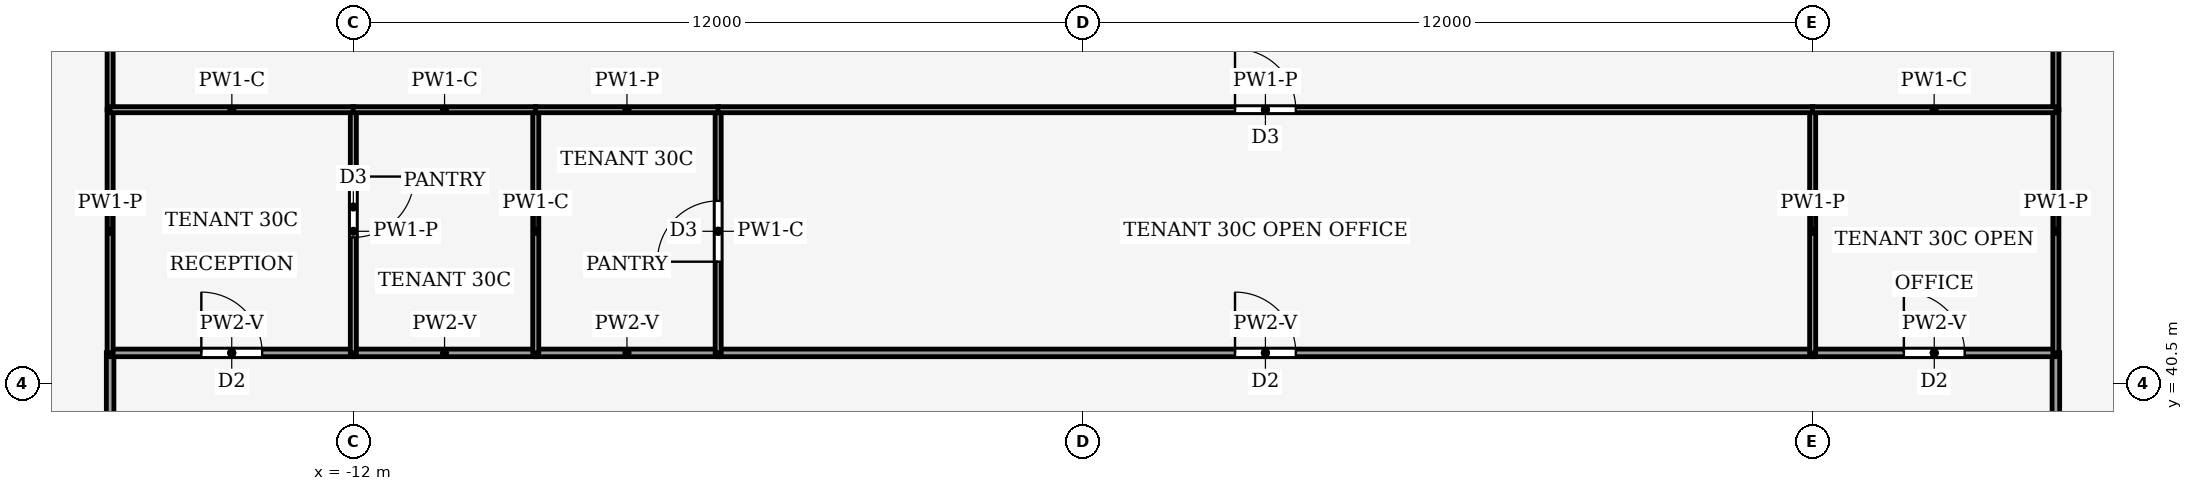
"""IFC4 building model, lengths in metres.
Left out: names, types, materials, properties, quantities, classifications, styles, units other than length and angle.
Written with IfcOpenShell. Run it as: python <this file> out.ifc"""

import sys

from ifc_helpers import new_model, si_unit, direction, frame, frame_2d, origin, place, context, subcontext, project, spatial, rectangle, extrude, element, fill, save


model = new_model("IFC4")
c1 = context("Model", 3, precision=1e-05, world=origin(), true_north=direction((0.0, 1.0)))
c2 = subcontext(c1, "Body", "Model", "MODEL_VIEW")
j1 = project(units=[si_unit("LENGTHUNIT", "METRE"), si_unit("PLANEANGLEUNIT", "RADIAN")], contexts=[c1])
p1 = place(None, origin())
s1 = spatial("IfcSite", under=j1, at=p1, CompositionType="ELEMENT")
p2 = place(p1, origin())
s2 = spatial("IfcBuilding", under=s1, at=p2, CompositionType="ELEMENT")
p3 = place(p2, frame((0.0, 0.0, 134.0)))
s3 = spatial("IfcBuildingStorey", under=s2, at=p3, CompositionType="ELEMENT", Elevation=134.0)
p4 = place(p3, frame((-16.0, 36.0, 0.0), z_axis=(0.0, 0.0, 1.0), x_axis=(0.0, 1.0, 0.0)))
e1 = element("IfcWall", 1, at=p4, inside=s3, PredefinedType="PARTITIONING", context=c2, shape_type="SweptSolid", body=[
    extrude(rectangle(XDim=5.004, YDim=0.125, at=frame_2d((2.502, 0.0))), origin(), (0.0, 0.0, 1.0), 3.14),
])
p5 = place(p4, frame((2.002, 0.0, 0.0)))
e2 = element("IfcOpeningElement", 2, at=p5, cuts=e1, PredefinedType="OPENING", context=c2, shape_type="SweptSolid", body=[
    extrude(rectangle(XDim=1.0, YDim=2.1, at=frame_2d((0.5, 1.05))), frame((0.0, 0.073, 0.0), z_axis=(0.0, -1.0, 0.0), x_axis=(1.0, 0.0, 0.0)), (0.0, 0.0, 1.0), 0.145),
])
p6 = place(p3, frame((16.0, 41.004, 0.0), z_axis=(0.0, 0.0, 1.0), x_axis=(0.0, -1.0, 0.0)))
e3 = element("IfcWall", 3, at=p6, inside=s3, PredefinedType="PARTITIONING", context=c2, shape_type="SweptSolid", body=[
    extrude(rectangle(XDim=5.004, YDim=0.125, at=frame_2d((2.502, 0.0))), origin(), (0.0, 0.0, 1.0), 3.14),
])
p7 = place(p6, frame((2.002, 0.0, 0.0)))
e4 = element("IfcOpeningElement", 4, at=p7, cuts=e3, PredefinedType="OPENING", context=c2, shape_type="SweptSolid", body=[
    extrude(rectangle(XDim=1.0, YDim=2.1, at=frame_2d((0.5, 1.05))), frame((0.0, 0.073, 0.0), z_axis=(0.0, -1.0, 0.0), x_axis=(1.0, 0.0, 0.0)), (0.0, 0.0, 1.0), 0.145),
])
p8 = place(p3, frame((-16.0, 41.0, 0.0), z_axis=(0.0, 0.0, 1.0), x_axis=(1.0, 0.0, 0.0)))
e5 = element("IfcWall", 5, at=p8, inside=s3, PredefinedType="PARTITIONING", context=c2, shape_type="SweptSolid", body=[
    extrude(rectangle(XDim=4.0, YDim=0.125, at=frame_2d((2.0, 0.0))), origin(), (0.0, 0.0, 1.0), 3.44),
])
p9 = place(p8, frame((1.5, 0.0, 0.0)))
e6 = element("IfcOpeningElement", 6, at=p9, cuts=e5, PredefinedType="OPENING", context=c2, shape_type="SweptSolid", body=[
    extrude(rectangle(XDim=1.0, YDim=2.1, at=frame_2d((0.5, 1.05))), frame((0.0, 0.073, 0.0), z_axis=(0.0, -1.0, 0.0), x_axis=(1.0, 0.0, 0.0)), (0.0, 0.0, 1.0), 0.145),
])
for number, where, z_axis, x_axis in (
    (7, (-9.0, 41.0, 0.0), (0.0, 0.0, 1.0), (-1.0, 0.0, 0.0)),
    (8, (-6.0, 41.0, 0.0), (0.0, 0.0, 1.0), (-1.0, 0.0, 0.0)),
):
    element("IfcWall", number, at=place(p3, frame(where, z_axis=z_axis, x_axis=x_axis)), inside=s3, PredefinedType="PARTITIONING", context=c2, shape_type="SweptSolid", body=[
        extrude(rectangle(XDim=3.0, YDim=0.125, at=frame_2d((1.5, 0.0))), origin(), (0.0, 0.0, 1.0), 3.44),
    ])
p10 = place(p3, frame((-6.0, 41.0, 0.0), z_axis=(0.0, 0.0, 1.0), x_axis=(1.0, 0.0, 0.0)))
e9 = element("IfcWall", 9, at=p10, inside=s3, PredefinedType="PARTITIONING", context=c2, shape_type="SweptSolid", body=[
    extrude(rectangle(XDim=18.0, YDim=0.125, at=frame_2d((9.0, 0.0))), origin(), (0.0, 0.0, 1.0), 3.44),
])
p11 = place(p10, frame((8.5, 0.0, 0.0)))
e10 = element("IfcOpeningElement", 10, at=p11, cuts=e9, PredefinedType="OPENING", context=c2, shape_type="SweptSolid", body=[
    extrude(rectangle(XDim=1.0, YDim=2.1, at=frame_2d((0.5, 1.05))), frame((0.0, 0.073, 0.0), z_axis=(0.0, -1.0, 0.0), x_axis=(1.0, 0.0, 0.0)), (0.0, 0.0, 1.0), 0.145),
])
p12 = place(p3, frame((12.0, 41.0, 0.0), z_axis=(0.0, 0.0, 1.0), x_axis=(1.0, 0.0, 0.0)))
e11 = element("IfcWall", 11, at=p12, inside=s3, PredefinedType="PARTITIONING", context=c2, shape_type="SweptSolid", body=[
    extrude(rectangle(XDim=4.0, YDim=0.125, at=frame_2d((2.0, 0.0))), origin(), (0.0, 0.0, 1.0), 3.44),
])
p13 = place(p12, frame((1.5, 0.0, 0.0)))
e12 = element("IfcOpeningElement", 12, at=p13, cuts=e11, PredefinedType="OPENING", context=c2, shape_type="SweptSolid", body=[
    extrude(rectangle(XDim=1.0, YDim=2.1, at=frame_2d((0.5, 1.05))), frame((0.0, 0.073, 0.0), z_axis=(0.0, -1.0, 0.0), x_axis=(1.0, 0.0, 0.0)), (0.0, 0.0, 1.0), 0.145),
])
p14 = place(p3, frame((-16.0, 41.0, 0.0), z_axis=(0.0, 0.0, 1.0), x_axis=(0.0, 1.0, 0.0)))
e13 = element("IfcWall", 13, at=p14, inside=s3, PredefinedType="PARTITIONING", context=c2, shape_type="SweptSolid", body=[
    extrude(rectangle(XDim=4.0, YDim=0.1, at=frame_2d((2.0, 0.0))), origin(), (0.0, 0.0, 1.0), 3.44),
])
p15 = place(p3, frame((-16.0, 45.0, 0.0), z_axis=(0.0, 0.0, 1.0), x_axis=(0.0, 1.0, 0.0)))
e14 = element("IfcWall", 14, at=p15, inside=s3, PredefinedType="PARTITIONING", context=c2, shape_type="SweptSolid", body=[
    extrude(rectangle(XDim=9.0, YDim=0.1, at=frame_2d((4.5, 0.0))), origin(), (0.0, 0.0, 1.0), 3.24),
])
p16 = place(p3, frame((16.0, 45.0, 0.0), z_axis=(0.0, 0.0, 1.0), x_axis=(0.0, -1.0, 0.0)))
e15 = element("IfcWall", 15, at=p16, inside=s3, PredefinedType="PARTITIONING", context=c2, shape_type="SweptSolid", body=[
    extrude(rectangle(XDim=4.0, YDim=0.1, at=frame_2d((2.0, 0.0))), origin(), (0.0, 0.0, 1.0), 3.44),
])
p17 = place(p3, frame((16.0, 54.0, 0.0), z_axis=(0.0, 0.0, 1.0), x_axis=(0.0, -1.0, 0.0)))
e16 = element("IfcWall", 16, at=p17, inside=s3, PredefinedType="PARTITIONING", context=c2, shape_type="SweptSolid", body=[
    extrude(rectangle(XDim=9.0, YDim=0.1, at=frame_2d((4.5, 0.0))), origin(), (0.0, 0.0, 1.0), 3.24),
])
p18 = place(p3, frame((-12.0, 45.0, 0.0), z_axis=(0.0, 0.0, 1.0), x_axis=(0.0, -1.0, 0.0)))
e17 = element("IfcWall", 17, at=p18, inside=s3, PredefinedType="PARTITIONING", context=c2, shape_type="SweptSolid", body=[
    extrude(rectangle(XDim=4.0, YDim=0.1, at=frame_2d((2.0, 0.0))), origin(), (0.0, 0.0, 1.0), 3.44),
])
p19 = place(p18, frame((1.1, 0.0, 0.0)))
e18 = element("IfcOpeningElement", 18, at=p19, cuts=e17, PredefinedType="OPENING", context=c2, shape_type="SweptSolid", body=[
    extrude(rectangle(XDim=1.0, YDim=2.1, at=frame_2d((0.5, 1.05))), frame((0.0, 0.06, 0.0), z_axis=(0.0, -1.0, 0.0), x_axis=(1.0, 0.0, 0.0)), (0.0, 0.0, 1.0), 0.12),
])
p20 = place(p3, frame((-11.996, 45.0, 0.0), z_axis=(0.0, 0.0, 1.0), x_axis=(-1.0, 0.0, 0.0)))
e19 = element("IfcWall", 19, at=p20, inside=s3, PredefinedType="PARTITIONING", context=c2, shape_type="SweptSolid", body=[
    extrude(rectangle(XDim=4.004, YDim=0.1, at=frame_2d((2.002, 0.0))), origin(), (0.0, 0.0, 1.0), 3.87),
])
p21 = place(p3, frame((-9.0, 41.0, 0.0), z_axis=(0.0, 0.0, 1.0), x_axis=(0.0, 1.0, 0.0)))
e20 = element("IfcWall", 20, at=p21, inside=s3, PredefinedType="PARTITIONING", context=c2, shape_type="SweptSolid", body=[
    extrude(rectangle(XDim=4.0, YDim=0.1, at=frame_2d((2.0, 0.0))), origin(), (0.0, 0.0, 1.0), 3.87),
])
p22 = place(p3, frame((-8.996, 45.0, 0.0), z_axis=(0.0, 0.0, 1.0), x_axis=(-1.0, 0.0, 0.0)))
e21 = element("IfcWall", 21, at=p22, inside=s3, PredefinedType="PARTITIONING", context=c2, shape_type="SweptSolid", body=[
    extrude(rectangle(XDim=3.008, YDim=0.1, at=frame_2d((1.504, 0.0))), origin(), (0.0, 0.0, 1.0), 3.87),
])
p23 = place(p3, frame((-6.0, 41.0, 0.0), z_axis=(0.0, 0.0, 1.0), x_axis=(0.0, 1.0, 0.0)))
e22 = element("IfcWall", 22, at=p23, inside=s3, PredefinedType="PARTITIONING", context=c2, shape_type="SweptSolid", body=[
    extrude(rectangle(XDim=4.0, YDim=0.1, at=frame_2d((2.0, 0.0))), origin(), (0.0, 0.0, 1.0), 3.87),
])
p24 = place(p23, frame((1.5, 0.0, 0.0)))
e23 = element("IfcOpeningElement", 23, at=p24, cuts=e22, PredefinedType="OPENING", context=c2, shape_type="SweptSolid", body=[
    extrude(rectangle(XDim=1.0, YDim=2.1, at=frame_2d((0.5, 1.05))), frame((0.0, 0.06, 0.0), z_axis=(0.0, -1.0, 0.0), x_axis=(1.0, 0.0, 0.0)), (0.0, 0.0, 1.0), 0.12),
])
p25 = place(p3, frame((-5.996, 45.0, 0.0), z_axis=(0.0, 0.0, 1.0), x_axis=(-1.0, 0.0, 0.0)))
e24 = element("IfcWall", 24, at=p25, inside=s3, PredefinedType="PARTITIONING", context=c2, shape_type="SweptSolid", body=[
    extrude(rectangle(XDim=3.008, YDim=0.1, at=frame_2d((1.504, 0.0))), origin(), (0.0, 0.0, 1.0), 3.44),
])
p26 = place(p3, frame((12.0, 41.0, 0.0), z_axis=(0.0, 0.0, 1.0), x_axis=(0.0, 1.0, 0.0)))
e25 = element("IfcWall", 25, at=p26, inside=s3, PredefinedType="PARTITIONING", context=c2, shape_type="SweptSolid", body=[
    extrude(rectangle(XDim=4.0, YDim=0.1, at=frame_2d((2.0, 0.0))), origin(), (0.0, 0.0, 1.0), 3.44),
])
p27 = place(p3, frame((-6.004, 45.0, 0.0), z_axis=(0.0, 0.0, 1.0), x_axis=(1.0, 0.0, 0.0)))
e26 = element("IfcWall", 26, at=p27, inside=s3, PredefinedType="PARTITIONING", context=c2, shape_type="SweptSolid", body=[
    extrude(rectangle(XDim=18.008, YDim=0.1, at=frame_2d((9.004, 0.0))), origin(), (0.0, 0.0, 1.0), 3.44),
])
p28 = place(p27, frame((8.504, 0.0, 0.0)))
e27 = element("IfcOpeningElement", 27, at=p28, cuts=e26, PredefinedType="OPENING", context=c2, shape_type="SweptSolid", body=[
    extrude(rectangle(XDim=1.0, YDim=2.1, at=frame_2d((0.5, 1.05))), frame((0.0, 0.06, 0.0), z_axis=(0.0, -1.0, 0.0), x_axis=(1.0, 0.0, 0.0)), (0.0, 0.0, 1.0), 0.12),
])
p29 = place(p3, frame((16.0, 45.0, 0.0), z_axis=(0.0, 0.0, 1.0), x_axis=(-1.0, 0.0, 0.0)))
e28 = element("IfcWall", 28, at=p29, inside=s3, PredefinedType="PARTITIONING", context=c2, shape_type="SweptSolid", body=[
    extrude(rectangle(XDim=4.004, YDim=0.1, at=frame_2d((2.002, 0.0))), origin(), (0.0, 0.0, 1.0), 3.87),
])
p30 = place(p9, origin())
e29 = element("IfcDoor", 29, at=p30, inside=s3, OperationType="SINGLE_SWING_RIGHT", PredefinedType="DOOR", context=c2, shape_type="SweptSolid", body=[
    extrude(rectangle(XDim=1.0, YDim=2.1, at=frame_2d((0.5, 1.05))), frame((0.0, 0.025, 0.0), z_axis=(0.0, -1.0, 0.0), x_axis=(1.0, 0.0, 0.0)), (0.0, 0.0, 1.0), 0.05),
])
fill(e6, e29)
p31 = place(p11, origin())
e30 = element("IfcDoor", 30, at=p31, inside=s3, OperationType="SINGLE_SWING_LEFT", PredefinedType="DOOR", context=c2, shape_type="SweptSolid", body=[
    extrude(rectangle(XDim=1.0, YDim=2.1, at=frame_2d((0.5, 1.05))), frame((0.0, 0.025, 0.0), z_axis=(0.0, -1.0, 0.0), x_axis=(1.0, 0.0, 0.0)), (0.0, 0.0, 1.0), 0.05),
])
fill(e10, e30)
p32 = place(p13, origin())
e31 = element("IfcDoor", 31, at=p32, inside=s3, OperationType="SINGLE_SWING_RIGHT", PredefinedType="DOOR", context=c2, shape_type="SweptSolid", body=[
    extrude(rectangle(XDim=1.0, YDim=2.1, at=frame_2d((0.5, 1.05))), frame((0.0, 0.025, 0.0), z_axis=(0.0, -1.0, 0.0), x_axis=(1.0, 0.0, 0.0)), (0.0, 0.0, 1.0), 0.05),
])
fill(e12, e31)
p33 = place(p19, origin())
e32 = element("IfcDoor", 32, at=p33, inside=s3, OperationType="SINGLE_SWING_LEFT", PredefinedType="DOOR", context=c2, shape_type="SweptSolid", body=[
    extrude(rectangle(XDim=1.0, YDim=2.1, at=frame_2d((0.5, 1.05))), frame((0.0, 0.025, 0.0), z_axis=(0.0, -1.0, 0.0), x_axis=(1.0, 0.0, 0.0)), (0.0, 0.0, 1.0), 0.05),
])
fill(e18, e32)
p34 = place(p24, origin())
e33 = element("IfcDoor", 33, at=p34, inside=s3, OperationType="SINGLE_SWING_RIGHT", PredefinedType="DOOR", context=c2, shape_type="SweptSolid", body=[
    extrude(rectangle(XDim=1.0, YDim=2.1, at=frame_2d((0.5, 1.05))), frame((0.0, 0.025, 0.0), z_axis=(0.0, -1.0, 0.0), x_axis=(1.0, 0.0, 0.0)), (0.0, 0.0, 1.0), 0.05),
])
fill(e23, e33)
p35 = place(p28, origin())
e34 = element("IfcDoor", 34, at=p35, inside=s3, OperationType="SINGLE_SWING_LEFT", PredefinedType="DOOR", context=c2, shape_type="SweptSolid", body=[
    extrude(rectangle(XDim=1.0, YDim=2.1, at=frame_2d((0.5, 1.05))), frame((0.0, 0.025, 0.0), z_axis=(0.0, -1.0, 0.0), x_axis=(1.0, 0.0, 0.0)), (0.0, 0.0, 1.0), 0.05),
])
fill(e27, e34)
save(model, sys.argv[1])
